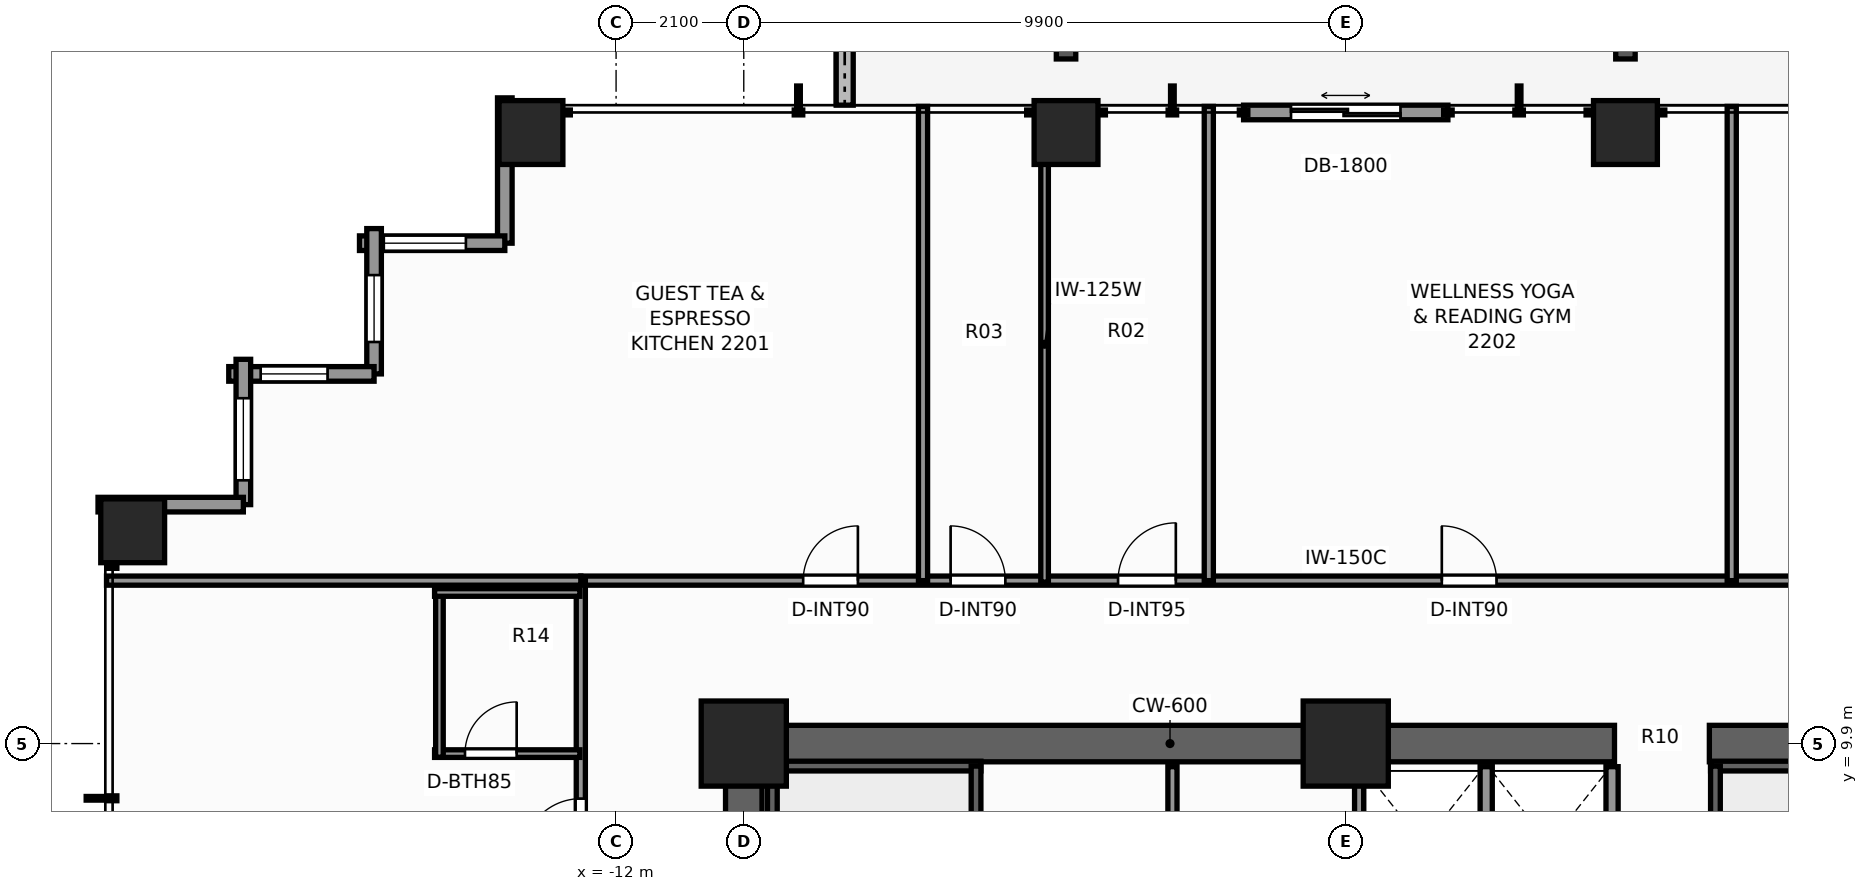
"""IFC4 building model, lengths in metres.
Left out: names, types, materials, properties, quantities, classifications, styles, units other than length and angle.
Written with IfcOpenShell. Run it as: python <this file> out.ifc"""

import sys

from ifc_helpers import new_model, si_unit, direction, frame, frame_2d, origin, origin_2d, place, context, subcontext, project, spatial, rectangle, extrude, element, fill, save


model = new_model("IFC4")
c1 = context("Model", 3, precision=1e-05, world=origin(), true_north=direction((0.0, 1.0)))
c2 = subcontext(c1, "Body", "Model", "MODEL_VIEW")
j1 = project(units=[si_unit("LENGTHUNIT", "METRE"), si_unit("PLANEANGLEUNIT", "RADIAN")], contexts=[c1])
p1 = place(None, origin())
s1 = spatial("IfcSite", under=j1, at=p1, CompositionType="ELEMENT")
p2 = place(p1, origin())
s2 = spatial("IfcBuilding", under=s1, at=p2, CompositionType="ELEMENT")
p3 = place(p2, frame((0.0, 0.0, 78.8)))
s3 = spatial("IfcBuildingStorey", under=s2, at=p3, CompositionType="ELEMENT", Elevation=78.8)
p4 = place(p3, frame((-10.2, 9.9, 0.0), z_axis=(0.0, 0.0, 1.0), x_axis=(1.0, 0.0, 0.0)))
e1 = element("IfcWall", 1, at=p4, inside=s3, PredefinedType="SHEAR", context=c2, shape_type="SweptSolid", body=[
    extrude(rectangle(XDim=14.62, YDim=0.6, at=frame_2d((7.31, 0.0))), origin(), (0.0, 0.0, 1.0), 3.3),
])
p5 = place(p3, frame((5.98, 9.9, 0.0), z_axis=(0.0, 0.0, 1.0), x_axis=(1.0, 0.0, 0.0)))
e2 = element("IfcWall", 2, at=p5, inside=s3, PredefinedType="SHEAR", context=c2, shape_type="SweptSolid", body=[
    extrude(rectangle(XDim=4.22, YDim=0.6, at=frame_2d((2.11, 0.0))), origin(), (0.0, 0.0, 1.0), 3.3),
])
p6 = place(p3, frame((-9.9, -3.7, 0.0), z_axis=(0.0, 0.0, 1.0), x_axis=(0.0, 1.0, 0.0)))
e3 = element("IfcWall", 3, at=p6, inside=s3, PredefinedType="SHEAR", context=c2, shape_type="SweptSolid", body=[
    extrude(rectangle(XDim=13.3, YDim=0.6, at=frame_2d((6.65, 0.0))), origin(), (0.0, 0.0, 1.0), 3.3),
])
p7 = place(p6, frame((0.35, 0.0, 0.0)))
e4 = element("IfcOpeningElement", 4, at=p7, cuts=e3, PredefinedType="OPENING", context=c2, shape_type="SweptSolid", body=[
    extrude(rectangle(XDim=1.1, YDim=2.2, at=frame_2d((0.55, 1.1))), frame((0.0, 0.31, 0.0), z_axis=(0.0, -1.0, 0.0), x_axis=(1.0, 0.0, 0.0)), (0.0, 0.0, 1.0), 0.62),
])
for number, where, z_axis, x_axis in (
    (5, (-9.9, 9.9, 0.0), (0.0, 0.0, 1.0), (1.0, 0.0, 0.0)),
    (6, (0.0, 9.9, 0.0), (0.0, 0.0, 1.0), (1.0, 0.0, 0.0)),
):
    element("IfcColumn", number, at=place(p3, frame(where, z_axis=z_axis, x_axis=x_axis)), inside=s3, PredefinedType="COLUMN", context=c2, shape_type="SweptSolid", body=[
        extrude(rectangle(XDim=1.4, YDim=1.4, at=origin_2d()), origin(), (0.0, 0.0, 1.0), 3.3),
    ])
for number, where, z_axis, x_axis in (
    (7, (-13.4, 19.95, 0.0), (0.0, 0.0, 1.0), (1.0, 0.0, 0.0)),
    (8, (-4.6, 19.95, 0.0), (0.0, 0.0, 1.0), (1.0, 0.0, 0.0)),
    (9, (4.6, 19.95, 0.0), (0.0, 0.0, 1.0), (1.0, 0.0, 0.0)),
    (10, (-19.95, 13.4, 0.0), (0.0, 0.0, 1.0), (1.0, 0.0, 0.0)),
):
    element("IfcColumn", number, at=place(p3, frame(where, z_axis=z_axis, x_axis=x_axis)), inside=s3, PredefinedType="COLUMN", context=c2, shape_type="SweptSolid", body=[
        extrude(rectangle(XDim=1.05, YDim=1.05, at=origin_2d()), origin(), (0.0, 0.0, 1.0), 3.3),
    ])
p8 = place(p3, frame((-8.24, 23.375, -0.04), z_axis=(0.0, 0.0, 1.0), x_axis=(0.0, -1.0, 0.0)))
e11 = element("IfcWall", 11, at=p8, inside=s3, PredefinedType="PARAPET", context=c2, shape_type="SweptSolid", body=[
    extrude(rectangle(XDim=2.975, YDim=0.28, at=frame_2d((1.487, 0.0))), origin(), (0.0, 0.0, 1.0), 0.42),
])
p9 = place(p3, frame((-1.68, 20.28, 0.0), z_axis=(0.0, 0.0, 1.0), x_axis=(1.0, 0.0, 0.0)))
e12 = element("IfcWall", 12, at=p9, inside=s3, PredefinedType="STANDARD", context=c2, shape_type="SweptSolid", body=[
    extrude(rectangle(XDim=3.36, YDim=0.24, at=frame_2d((1.68, 0.0))), origin(), (0.0, 0.0, 1.0), 3.08),
])
p10 = place(p9, frame((0.78, 0.0, 0.0)))
e13 = element("IfcOpeningElement", 13, at=p10, cuts=e12, PredefinedType="OPENING", context=c2, shape_type="SweptSolid", body=[
    extrude(rectangle(XDim=1.8, YDim=2.2, at=frame_2d((0.9, 1.1))), frame((0.0, 0.13, 0.0), z_axis=(0.0, -1.0, 0.0), x_axis=(1.0, 0.0, 0.0)), (0.0, 0.0, 1.0), 0.26),
])
p11 = place(p3, frame((-13.83, 18.13, 0.0), z_axis=(0.0, 0.0, 1.0), x_axis=(0.0, 1.0, 0.0)))
e14 = element("IfcWall", 14, at=p11, inside=s3, PredefinedType="STANDARD", context=c2, shape_type="SweptSolid", body=[
    extrude(rectangle(XDim=2.39, YDim=0.24, at=frame_2d((1.195, 0.0))), origin(), (0.0, 0.0, 1.0), 2.459),
])
p12 = place(p3, frame((-16.22, 18.13, 0.0), z_axis=(0.0, 0.0, 1.0), x_axis=(1.0, 0.0, 0.0)))
e15 = element("IfcWall", 15, at=p12, inside=s3, PredefinedType="STANDARD", context=c2, shape_type="SweptSolid", body=[
    extrude(rectangle(XDim=2.39, YDim=0.24, at=frame_2d((1.195, 0.0))), origin(), (0.0, 0.0, 1.0), 2.459),
])
p13 = place(p12, frame((0.4, 0.0, 0.65)))
e16 = element("IfcOpeningElement", 16, at=p13, cuts=e15, PredefinedType="OPENING", context=c2, shape_type="SweptSolid", body=[
    extrude(rectangle(XDim=1.35, YDim=1.55, at=frame_2d((0.675, 0.775))), frame((0.0, 0.13, 0.0), z_axis=(0.0, -1.0, 0.0), x_axis=(1.0, 0.0, 0.0)), (0.0, 0.0, 1.0), 0.26),
])
p14 = place(p3, frame((-15.98, 15.98, 0.0), z_axis=(0.0, 0.0, 1.0), x_axis=(0.0, 1.0, 0.0)))
e17 = element("IfcWall", 17, at=p14, inside=s3, PredefinedType="STANDARD", context=c2, shape_type="SweptSolid", body=[
    extrude(rectangle(XDim=2.39, YDim=0.24, at=frame_2d((1.195, 0.0))), origin(), (0.0, 0.0, 1.0), 2.459),
])
p15 = place(p14, frame((0.525, 0.0, 0.65)))
e18 = element("IfcOpeningElement", 18, at=p15, cuts=e17, PredefinedType="OPENING", context=c2, shape_type="SweptSolid", body=[
    extrude(rectangle(XDim=1.1, YDim=1.45, at=frame_2d((0.55, 0.725))), frame((0.0, 0.13, 0.0), z_axis=(0.0, -1.0, 0.0), x_axis=(1.0, 0.0, 0.0)), (0.0, 0.0, 1.0), 0.26),
])
p16 = place(p3, frame((-18.37, 15.98, 0.0), z_axis=(0.0, 0.0, 1.0), x_axis=(1.0, 0.0, 0.0)))
e19 = element("IfcWall", 19, at=p16, inside=s3, PredefinedType="STANDARD", context=c2, shape_type="SweptSolid", body=[
    extrude(rectangle(XDim=2.39, YDim=0.24, at=frame_2d((1.195, 0.0))), origin(), (0.0, 0.0, 1.0), 2.459),
])
p17 = place(p16, frame((0.525, 0.0, 0.65)))
e20 = element("IfcOpeningElement", 20, at=p17, cuts=e19, PredefinedType="OPENING", context=c2, shape_type="SweptSolid", body=[
    extrude(rectangle(XDim=1.1, YDim=1.45, at=frame_2d((0.55, 0.725))), frame((0.0, 0.13, 0.0), z_axis=(0.0, -1.0, 0.0), x_axis=(1.0, 0.0, 0.0)), (0.0, 0.0, 1.0), 0.26),
])
p18 = place(p3, frame((-18.13, 13.83, 0.0), z_axis=(0.0, 0.0, 1.0), x_axis=(0.0, 1.0, 0.0)))
e21 = element("IfcWall", 21, at=p18, inside=s3, PredefinedType="STANDARD", context=c2, shape_type="SweptSolid", body=[
    extrude(rectangle(XDim=2.39, YDim=0.24, at=frame_2d((1.195, 0.0))), origin(), (0.0, 0.0, 1.0), 2.459),
])
p19 = place(p18, frame((0.4, 0.0, 0.65)))
e22 = element("IfcOpeningElement", 22, at=p19, cuts=e21, PredefinedType="OPENING", context=c2, shape_type="SweptSolid", body=[
    extrude(rectangle(XDim=1.35, YDim=1.55, at=frame_2d((0.675, 0.775))), frame((0.0, 0.13, 0.0), z_axis=(0.0, -1.0, 0.0), x_axis=(1.0, 0.0, 0.0)), (0.0, 0.0, 1.0), 0.26),
])
p20 = place(p3, frame((-20.52, 13.83, 0.0), z_axis=(0.0, 0.0, 1.0), x_axis=(1.0, 0.0, 0.0)))
e23 = element("IfcWall", 23, at=p20, inside=s3, PredefinedType="STANDARD", context=c2, shape_type="SweptSolid", body=[
    extrude(rectangle(XDim=2.39, YDim=0.24, at=frame_2d((1.195, 0.0))), origin(), (0.0, 0.0, 1.0), 2.459),
])
p21 = place(p3, frame((-9.52, 9.53, 0.0), z_axis=(0.0, 0.0, 1.0), x_axis=(1.0, 0.0, 0.0)))
e24 = element("IfcWall", 24, at=p21, inside=s3, PredefinedType="SHEAR", context=c2, shape_type="SweptSolid", body=[
    extrude(rectangle(XDim=3.52, YDim=0.16, at=frame_2d((1.76, 0.0))), origin(), (0.0, 0.0, 1.0), 3.3),
])
for number, where, z_axis, x_axis in (
    (25, (-9.43, 1.97, 0.0), (0.0, 0.0, 1.0), (0.0, 1.0, 0.0)),
    (26, (-6.08, 1.97, 0.0), (0.0, 0.0, 1.0), (0.0, 1.0, 0.0)),
):
    element("IfcWall", number, at=place(p3, frame(where, z_axis=z_axis, x_axis=x_axis)), inside=s3, PredefinedType="SHEAR", context=c2, shape_type="SweptSolid", body=[
        extrude(rectangle(XDim=7.56, YDim=0.16, at=frame_2d((3.78, 0.0))), origin(), (0.0, 0.0, 1.0), 3.3),
    ])
p22 = place(p3, frame((6.0, 9.53, 0.0), z_axis=(0.0, 0.0, 1.0), x_axis=(1.0, 0.0, 0.0)))
e27 = element("IfcWall", 27, at=p22, inside=s3, PredefinedType="SHEAR", context=c2, shape_type="SweptSolid", body=[
    extrude(rectangle(XDim=3.52, YDim=0.16, at=frame_2d((1.76, 0.0))), origin(), (0.0, 0.0, 1.0), 3.3),
])
p23 = place(p3, frame((6.08, 1.97, 0.0), z_axis=(0.0, 0.0, 1.0), x_axis=(0.0, 1.0, 0.0)))
e28 = element("IfcWall", 28, at=p23, inside=s3, PredefinedType="SHEAR", context=c2, shape_type="SweptSolid", body=[
    extrude(rectangle(XDim=7.56, YDim=0.16, at=frame_2d((3.78, 0.0))), origin(), (0.0, 0.0, 1.0), 3.3),
])
p24 = place(p3, frame((0.22, 4.3, 0.0), z_axis=(0.0, 0.0, 1.0), x_axis=(0.0, 1.0, 0.0)))
e29 = element("IfcWall", 29, at=p24, inside=s3, PredefinedType="PARTITIONING", context=c2, shape_type="SweptSolid", body=[
    extrude(rectangle(XDim=5.22, YDim=0.15, at=frame_2d((2.61, 0.0))), origin(), (0.0, 0.0, 1.0), 3.08),
])
p25 = place(p24, frame((0.65, 0.0, 0.0)))
e30 = element("IfcOpeningElement", 30, at=p25, cuts=e29, PredefinedType="OPENING", context=c2, shape_type="SweptSolid", body=[
    extrude(rectangle(XDim=0.95, YDim=2.06, at=frame_2d((0.475, 1.03))), frame((0.0, 0.085, 0.0), z_axis=(0.0, -1.0, 0.0), x_axis=(1.0, 0.0, 0.0)), (0.0, 0.0, 1.0), 0.17),
])
p26 = place(p3, frame((-2.85, 4.3, 0.0), z_axis=(0.0, 0.0, 1.0), x_axis=(0.0, 1.0, 0.0)))
e31 = element("IfcWall", 31, at=p26, inside=s3, PredefinedType="PARTITIONING", context=c2, shape_type="SweptSolid", body=[
    extrude(rectangle(XDim=5.22, YDim=0.15, at=frame_2d((2.61, 0.0))), origin(), (0.0, 0.0, 1.0), 3.08),
])
p27 = place(p26, frame((0.85, 0.0, 0.0)))
e32 = element("IfcOpeningElement", 32, at=p27, cuts=e31, PredefinedType="OPENING", context=c2, shape_type="SweptSolid", body=[
    extrude(rectangle(XDim=0.85, YDim=2.03, at=frame_2d((0.425, 1.015))), frame((0.0, 0.085, 0.0), z_axis=(0.0, -1.0, 0.0), x_axis=(1.0, 0.0, 0.0)), (0.0, 0.0, 1.0), 0.17),
])
for number, where, z_axis, x_axis in (
    (33, (4.38, 6.95, 0.0), (0.0, 0.0, 1.0), (0.0, 1.0, 0.0)),
    (34, (2.31, 6.95, 0.0), (0.0, 0.0, 1.0), (0.0, 1.0, 0.0)),
):
    element("IfcWall", number, at=place(p3, frame(where, z_axis=z_axis, x_axis=x_axis)), inside=s3, PredefinedType="SOLIDWALL", context=c2, shape_type="SweptSolid", body=[
        extrude(rectangle(XDim=2.57, YDim=0.2, at=frame_2d((1.285, 0.0))), origin(), (0.0, 0.0, 1.0), 3.08),
    ])
p28 = place(p3, frame((-12.58, 12.58, 0.0), z_axis=(0.0, 0.0, 1.0), x_axis=(1.0, 0.0, 0.0)))
e35 = element("IfcWall", 35, at=p28, inside=s3, PredefinedType="PARTITIONING", context=c2, shape_type="SweptSolid", body=[
    extrude(rectangle(XDim=25.16, YDim=0.15, at=frame_2d((12.58, 0.0))), origin(), (0.0, 0.0, 1.0), 2.292),
])
p29 = place(p28, frame((3.657, 0.0, 0.0)))
e36 = element("IfcOpeningElement", 36, at=p29, cuts=e35, PredefinedType="OPENING", context=c2, shape_type="SweptSolid", body=[
    extrude(rectangle(XDim=0.9, YDim=2.06, at=frame_2d((0.45, 1.03))), frame((0.0, 0.085, 0.0), z_axis=(0.0, -1.0, 0.0), x_axis=(1.0, 0.0, 0.0)), (0.0, 0.0, 1.0), 0.17),
])
p30 = place(p28, frame((6.082, 0.0, 0.0)))
e37 = element("IfcOpeningElement", 37, at=p30, cuts=e35, PredefinedType="OPENING", context=c2, shape_type="SweptSolid", body=[
    extrude(rectangle(XDim=0.9, YDim=2.06, at=frame_2d((0.45, 1.03))), frame((0.0, 0.085, 0.0), z_axis=(0.0, -1.0, 0.0), x_axis=(1.0, 0.0, 0.0)), (0.0, 0.0, 1.0), 0.17),
])
p31 = place(p28, frame((8.836, 0.0, 0.0)))
e38 = element("IfcOpeningElement", 38, at=p31, cuts=e35, PredefinedType="OPENING", context=c2, shape_type="SweptSolid", body=[
    extrude(rectangle(XDim=0.95, YDim=2.06, at=frame_2d((0.475, 1.03))), frame((0.0, 0.085, 0.0), z_axis=(0.0, -1.0, 0.0), x_axis=(1.0, 0.0, 0.0)), (0.0, 0.0, 1.0), 0.17),
])
p32 = place(p28, frame((14.16, 0.0, 0.0)))
e39 = element("IfcOpeningElement", 39, at=p32, cuts=e35, PredefinedType="OPENING", context=c2, shape_type="SweptSolid", body=[
    extrude(rectangle(XDim=0.9, YDim=2.06, at=frame_2d((0.45, 1.03))), frame((0.0, 0.085, 0.0), z_axis=(0.0, -1.0, 0.0), x_axis=(1.0, 0.0, 0.0)), (0.0, 0.0, 1.0), 0.17),
])
p33 = place(p28, frame((20.341, 0.0, 0.0)))
e40 = element("IfcOpeningElement", 40, at=p33, cuts=e35, PredefinedType="OPENING", context=c2, shape_type="SweptSolid", body=[
    extrude(rectangle(XDim=0.9, YDim=2.06, at=frame_2d((0.45, 1.03))), frame((0.0, 0.085, 0.0), z_axis=(0.0, -1.0, 0.0), x_axis=(1.0, 0.0, 0.0)), (0.0, 0.0, 1.0), 0.17),
])
p34 = place(p3, frame((-12.58, 7.4, 0.0), z_axis=(0.0, 0.0, 1.0), x_axis=(0.0, 1.0, 0.0)))
e41 = element("IfcWall", 41, at=p34, inside=s3, PredefinedType="PARTITIONING", context=c2, shape_type="SweptSolid", body=[
    extrude(rectangle(XDim=5.18, YDim=0.15, at=frame_2d((2.59, 0.0))), origin(), (0.0, 0.0, 1.0), 2.292),
])
p35 = place(p34, frame((0.645, 0.0, 0.0)))
e42 = element("IfcOpeningElement", 42, at=p35, cuts=e41, PredefinedType="OPENING", context=c2, shape_type="SweptSolid", body=[
    extrude(rectangle(XDim=0.95, YDim=2.06, at=frame_2d((0.475, 1.03))), frame((0.0, 0.085, 0.0), z_axis=(0.0, -1.0, 0.0), x_axis=(1.0, 0.0, 0.0)), (0.0, 0.0, 1.0), 0.17),
])
p36 = place(p3, frame((-20.38, 12.58, 0.0), z_axis=(0.0, 0.0, 1.0), x_axis=(1.0, 0.0, 0.0)))
e43 = element("IfcWall", 43, at=p36, inside=s3, PredefinedType="PARTITIONING", context=c2, shape_type="SweptSolid", body=[
    extrude(rectangle(XDim=7.8, YDim=0.15, at=frame_2d((3.9, 0.0))), origin(), (0.0, 0.0, 1.0), 2.292),
])
for number, where, z_axis, x_axis in (
    (44, (-6.952, 12.58, 0.0), (0.0, 0.0, 1.0), (0.0, 1.0, 0.0)),
    (45, (-2.252, 12.58, 0.0), (0.0, 0.0, 1.0), (0.0, 1.0, 0.0)),
):
    element("IfcWall", number, at=place(p3, frame(where, z_axis=z_axis, x_axis=x_axis)), inside=s3, PredefinedType="PARTITIONING", context=c2, shape_type="SweptSolid", body=[
        extrude(rectangle(XDim=7.8, YDim=0.15, at=frame_2d((3.9, 0.0))), origin(), (0.0, 0.0, 1.0), 2.449),
    ])
p37 = place(p3, frame((-4.953, 12.555, 0.0), z_axis=(0.0, 0.0, 1.0), x_axis=(0.0, 1.0, 0.0)))
e46 = element("IfcWall", 46, at=p37, inside=s3, PredefinedType="PARTITIONING", context=c2, shape_type="SweptSolid", body=[
    extrude(rectangle(XDim=7.825, YDim=0.125, at=frame_2d((3.913, 0.0))), origin(), (0.0, 0.0, 1.0), 2.449),
])
p38 = place(p3, frame((6.348, 12.58, 0.0), z_axis=(0.0, 0.0, 1.0), x_axis=(0.0, 1.0, 0.0)))
e47 = element("IfcWall", 47, at=p38, inside=s3, PredefinedType="PARTITIONING", context=c2, shape_type="SweptSolid", body=[
    extrude(rectangle(XDim=7.8, YDim=0.15, at=frame_2d((3.9, 0.0))), origin(), (0.0, 0.0, 1.0), 2.449),
])
p39 = place(p3, frame((-14.985, 9.735, 0.0), z_axis=(0.0, 0.0, 1.0), x_axis=(1.0, 0.0, 0.0)))
e48 = element("IfcWall", 48, at=p39, inside=s3, PredefinedType="PARTITIONING", context=c2, shape_type="SweptSolid", body=[
    extrude(rectangle(XDim=2.39, YDim=0.125, at=frame_2d((1.195, 0.0))), origin(), (0.0, 0.0, 1.0), 3.08),
])
p40 = place(p39, frame((0.5, 0.0, 0.0)))
e49 = element("IfcOpeningElement", 49, at=p40, cuts=e48, PredefinedType="OPENING", context=c2, shape_type="SweptSolid", body=[
    extrude(rectangle(XDim=0.85, YDim=2.03, at=frame_2d((0.425, 1.015))), frame((0.0, 0.073, 0.0), z_axis=(0.0, -1.0, 0.0), x_axis=(1.0, 0.0, 0.0)), (0.0, 0.0, 1.0), 0.145),
])
p41 = place(p3, frame((-14.905, 9.675, 0.0), z_axis=(0.0, 0.0, 1.0), x_axis=(0.0, 1.0, 0.0)))
e50 = element("IfcWall", 50, at=p41, inside=s3, PredefinedType="PARTITIONING", context=c2, shape_type="SweptSolid", body=[
    extrude(rectangle(XDim=2.77, YDim=0.125, at=frame_2d((1.385, 0.0))), origin(), (0.0, 0.0, 1.0), 2.292),
])
p42 = place(p3, frame((-14.985, 12.385, 0.0), z_axis=(0.0, 0.0, 1.0), x_axis=(1.0, 0.0, 0.0)))
e51 = element("IfcWall", 51, at=p42, inside=s3, PredefinedType="PARTITIONING", context=c2, shape_type="SweptSolid", body=[
    extrude(rectangle(XDim=2.39, YDim=0.125, at=frame_2d((1.195, 0.0))), origin(), (0.0, 0.0, 1.0), 3.08),
])
p43 = place(p10, origin())
e52 = element("IfcDoor", 52, at=p43, inside=s3, OperationType="DOUBLE_DOOR_SLIDING", PredefinedType="DOOR", context=c2, shape_type="SweptSolid", body=[
    extrude(rectangle(XDim=1.8, YDim=2.2, at=frame_2d((0.9, 1.1))), frame((0.0, 0.025, 0.0), z_axis=(0.0, -1.0, 0.0), x_axis=(1.0, 0.0, 0.0)), (0.0, 0.0, 1.0), 0.05),
])
fill(e13, e52)
p44 = place(p13, origin())
e53 = element("IfcWindow", 53, at=p44, inside=s3, PartitioningType="SINGLE_PANEL", PredefinedType="WINDOW", context=c2, shape_type="SweptSolid", body=[
    extrude(rectangle(XDim=1.35, YDim=1.55, at=frame_2d((0.675, 0.775))), frame((0.0, 0.03, 0.0), z_axis=(0.0, -1.0, 0.0), x_axis=(1.0, 0.0, 0.0)), (0.0, 0.0, 1.0), 0.06),
])
fill(e16, e53)
p45 = place(p15, origin())
e54 = element("IfcWindow", 54, at=p45, inside=s3, PartitioningType="SINGLE_PANEL", PredefinedType="WINDOW", context=c2, shape_type="SweptSolid", body=[
    extrude(rectangle(XDim=1.1, YDim=1.45, at=frame_2d((0.55, 0.725))), frame((0.0, 0.03, 0.0), z_axis=(0.0, -1.0, 0.0), x_axis=(1.0, 0.0, 0.0)), (0.0, 0.0, 1.0), 0.06),
])
fill(e18, e54)
p46 = place(p17, origin())
e55 = element("IfcWindow", 55, at=p46, inside=s3, PartitioningType="SINGLE_PANEL", PredefinedType="WINDOW", context=c2, shape_type="SweptSolid", body=[
    extrude(rectangle(XDim=1.1, YDim=1.45, at=frame_2d((0.55, 0.725))), frame((0.0, 0.03, 0.0), z_axis=(0.0, -1.0, 0.0), x_axis=(1.0, 0.0, 0.0)), (0.0, 0.0, 1.0), 0.06),
])
fill(e20, e55)
p47 = place(p19, origin())
e56 = element("IfcWindow", 56, at=p47, inside=s3, PartitioningType="SINGLE_PANEL", PredefinedType="WINDOW", context=c2, shape_type="SweptSolid", body=[
    extrude(rectangle(XDim=1.35, YDim=1.55, at=frame_2d((0.675, 0.775))), frame((0.0, 0.03, 0.0), z_axis=(0.0, -1.0, 0.0), x_axis=(1.0, 0.0, 0.0)), (0.0, 0.0, 1.0), 0.06),
])
fill(e22, e56)
p48 = place(p29, origin())
e57 = element("IfcDoor", 57, at=p48, inside=s3, OperationType="SINGLE_SWING_RIGHT", PredefinedType="DOOR", context=c2, shape_type="SweptSolid", body=[
    extrude(rectangle(XDim=0.9, YDim=2.06, at=frame_2d((0.45, 1.03))), frame((0.0, 0.025, 0.0), z_axis=(0.0, -1.0, 0.0), x_axis=(1.0, 0.0, 0.0)), (0.0, 0.0, 1.0), 0.05),
])
fill(e36, e57)
p49 = place(p30, origin())
e58 = element("IfcDoor", 58, at=p49, inside=s3, OperationType="SINGLE_SWING_LEFT", PredefinedType="DOOR", context=c2, shape_type="SweptSolid", body=[
    extrude(rectangle(XDim=0.9, YDim=2.06, at=frame_2d((0.45, 1.03))), frame((0.0, 0.025, 0.0), z_axis=(0.0, -1.0, 0.0), x_axis=(1.0, 0.0, 0.0)), (0.0, 0.0, 1.0), 0.05),
])
fill(e37, e58)
p50 = place(p31, origin())
e59 = element("IfcDoor", 59, at=p50, inside=s3, OperationType="SINGLE_SWING_RIGHT", PredefinedType="DOOR", context=c2, shape_type="SweptSolid", body=[
    extrude(rectangle(XDim=0.95, YDim=2.06, at=frame_2d((0.475, 1.03))), frame((0.0, 0.025, 0.0), z_axis=(0.0, -1.0, 0.0), x_axis=(1.0, 0.0, 0.0)), (0.0, 0.0, 1.0), 0.05),
])
fill(e38, e59)
p51 = place(p32, origin())
e60 = element("IfcDoor", 60, at=p51, inside=s3, OperationType="SINGLE_SWING_LEFT", PredefinedType="DOOR", context=c2, shape_type="SweptSolid", body=[
    extrude(rectangle(XDim=0.9, YDim=2.06, at=frame_2d((0.45, 1.03))), frame((0.0, 0.025, 0.0), z_axis=(0.0, -1.0, 0.0), x_axis=(1.0, 0.0, 0.0)), (0.0, 0.0, 1.0), 0.05),
])
fill(e39, e60)
p52 = place(p40, origin())
e61 = element("IfcDoor", 61, at=p52, inside=s3, OperationType="SINGLE_SWING_RIGHT", PredefinedType="DOOR", context=c2, shape_type="SweptSolid", body=[
    extrude(rectangle(XDim=0.85, YDim=2.03, at=frame_2d((0.425, 1.015))), frame((0.0, 0.025, 0.0), z_axis=(0.0, -1.0, 0.0), x_axis=(1.0, 0.0, 0.0)), (0.0, 0.0, 1.0), 0.05),
])
fill(e49, e61)
p53 = place(p35, origin())
e62 = element("IfcDoor", 62, at=p53, inside=s3, OperationType="SINGLE_SWING_LEFT", PredefinedType="DOOR", context=c2, shape_type="SweptSolid", body=[
    extrude(rectangle(XDim=0.95, YDim=2.06, at=frame_2d((0.475, 1.03))), frame((0.0, 0.025, 0.0), z_axis=(0.0, -1.0, 0.0), x_axis=(1.0, 0.0, 0.0)), (0.0, 0.0, 1.0), 0.05),
])
fill(e42, e62)
save(model, sys.argv[1])
